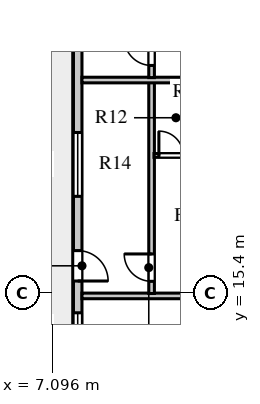
"""IFC4 building model, lengths in metres.
Left out: names, types, materials, properties, quantities, classifications, styles, units other than length and angle.
Written with IfcOpenShell. Run it as: python <this file> out.ifc"""

import sys

from ifc_helpers import new_model, si_unit, direction, frame, frame_2d, origin, place, context, subcontext, project, spatial, rectangle, extrude, element, fill, save


model = new_model("IFC4")
c1 = context("Model", 3, precision=1e-05, world=origin(), true_north=direction((0.0, 1.0)))
c2 = subcontext(c1, "Body", "Model", "MODEL_VIEW")
j1 = project(units=[si_unit("LENGTHUNIT", "METRE"), si_unit("PLANEANGLEUNIT", "RADIAN")], contexts=[c1])
p1 = place(None, origin())
s1 = spatial("IfcSite", under=j1, at=p1, CompositionType="ELEMENT")
p2 = place(p1, origin())
s2 = spatial("IfcBuilding", under=s1, at=p2, CompositionType="ELEMENT")
p3 = place(p2, frame((0.0, 0.0, 260.9)))
s3 = spatial("IfcBuildingStorey", under=s2, at=p3, CompositionType="ELEMENT", Elevation=260.9)
p4 = place(p3, frame((7.94, 44.07, 0.0), z_axis=(0.0, 0.0, 1.0), x_axis=(0.0, -1.0, 0.0)))
e1 = element("IfcWall", 1, at=p4, inside=s3, PredefinedType="STANDARD", context=c2, shape_type="SweptSolid", body=[
    extrude(rectangle(XDim=30.94, YDim=0.28, at=frame_2d((15.47, 0.0))), origin(), (0.0, 0.0, 1.0), 3.66),
])
p5 = place(p4, frame((29.325, 0.0, 0.8)))
e2 = element("IfcOpeningElement", 2, at=p5, cuts=e1, PredefinedType="OPENING", context=c2, shape_type="SweptSolid", body=[
    extrude(rectangle(XDim=0.95, YDim=1.65, at=frame_2d((0.475, 0.825))), frame((0.0, 0.15, 0.0), z_axis=(0.0, -1.0, 0.0), x_axis=(1.0, 0.0, 0.0)), (0.0, 0.0, 1.0), 0.3),
])
p6 = place(p4, frame((27.28, 0.0, 0.0)))
e3 = element("IfcOpeningElement", 3, at=p6, cuts=e1, PredefinedType="OPENING", context=c2, shape_type="SweptSolid", body=[
    extrude(rectangle(XDim=1.0, YDim=2.05, at=frame_2d((0.5, 1.025))), frame((0.0, 0.15, 0.0), z_axis=(0.0, -1.0, 0.0), x_axis=(1.0, 0.0, 0.0)), (0.0, 0.0, 1.0), 0.3),
])
p7 = place(p4, frame((23.395, 0.0, 0.8)))
e4 = element("IfcOpeningElement", 4, at=p7, cuts=e1, PredefinedType="OPENING", context=c2, shape_type="SweptSolid", body=[
    extrude(rectangle(XDim=2.1, YDim=1.95, at=frame_2d((1.05, 0.975))), frame((0.0, 0.15, 0.0), z_axis=(0.0, -1.0, 0.0), x_axis=(1.0, 0.0, 0.0)), (0.0, 0.0, 1.0), 0.3),
])
p8 = place(p4, frame((17.695, 0.0, 0.8)))
e5 = element("IfcOpeningElement", 5, at=p8, cuts=e1, PredefinedType="OPENING", context=c2, shape_type="SweptSolid", body=[
    extrude(rectangle(XDim=1.35, YDim=1.9, at=frame_2d((0.675, 0.95))), frame((0.0, 0.15, 0.0), z_axis=(0.0, -1.0, 0.0), x_axis=(1.0, 0.0, 0.0)), (0.0, 0.0, 1.0), 0.3),
])
p9 = place(p4, frame((11.02, 0.0, 0.8)))
e6 = element("IfcOpeningElement", 6, at=p9, cuts=e1, PredefinedType="OPENING", context=c2, shape_type="SweptSolid", body=[
    extrude(rectangle(XDim=1.65, YDim=1.95, at=frame_2d((0.825, 0.975))), frame((0.0, 0.15, 0.0), z_axis=(0.0, -1.0, 0.0), x_axis=(1.0, 0.0, 0.0)), (0.0, 0.0, 1.0), 0.3),
])
p10 = place(p4, frame((4.42, 0.0, 0.8)))
e7 = element("IfcOpeningElement", 7, at=p10, cuts=e1, PredefinedType="OPENING", context=c2, shape_type="SweptSolid", body=[
    extrude(rectangle(XDim=1.95, YDim=2.0, at=frame_2d((0.975, 1.0))), frame((0.0, 0.15, 0.0), z_axis=(0.0, -1.0, 0.0), x_axis=(1.0, 0.0, 0.0)), (0.0, 0.0, 1.0), 0.3),
])
p11 = place(p4, frame((0.665, 0.0, 0.8)))
e8 = element("IfcOpeningElement", 8, at=p11, cuts=e1, PredefinedType="OPENING", context=c2, shape_type="SweptSolid", body=[
    extrude(rectangle(XDim=0.95, YDim=1.65, at=frame_2d((0.475, 0.825))), frame((0.0, 0.15, 0.0), z_axis=(0.0, -1.0, 0.0), x_axis=(1.0, 0.0, 0.0)), (0.0, 0.0, 1.0), 0.3),
])
p12 = place(p3, frame((8.08, 15.3, 0.0), z_axis=(0.0, 0.0, 1.0), x_axis=(1.0, 0.0, 0.0)))
e9 = element("IfcWall", 9, at=p12, inside=s3, PredefinedType="SOLIDWALL", context=c2, shape_type="SweptSolid", body=[
    extrude(rectangle(XDim=5.62, YDim=0.185, at=frame_2d((2.81, 0.0))), origin(), (0.0, 0.0, 1.0), 3.21),
])
p13 = place(p3, frame((10.37, 15.38, 0.0), z_axis=(0.0, 0.0, 1.0), x_axis=(0.0, 1.0, 0.0)))
e10 = element("IfcWall", 10, at=p13, inside=s3, PredefinedType="SOLIDWALL", context=c2, shape_type="SweptSolid", body=[
    extrude(rectangle(XDim=6.94, YDim=0.185, at=frame_2d((3.47, 0.0))), origin(), (0.0, 0.0, 1.0), 3.66),
])
p14 = place(p13, frame((0.4, 0.0, 0.0)))
e11 = element("IfcOpeningElement", 11, at=p14, cuts=e10, PredefinedType="OPENING", context=c2, shape_type="SweptSolid", body=[
    extrude(rectangle(XDim=0.9, YDim=2.08, at=frame_2d((0.45, 1.04))), frame((0.0, 0.103, 0.0), z_axis=(0.0, -1.0, 0.0), x_axis=(1.0, 0.0, 0.0)), (0.0, 0.0, 1.0), 0.205),
])
p15 = place(p3, frame((10.45, 19.92, 0.0), z_axis=(0.0, 0.0, 1.0), x_axis=(1.0, 0.0, 0.0)))
e12 = element("IfcWall", 12, at=p15, inside=s3, PredefinedType="PLUMBINGWALL", context=c2, shape_type="SweptSolid", body=[
    extrude(rectangle(XDim=3.17, YDim=0.125, at=frame_2d((1.585, 0.0))), origin(), (0.0, 0.0, 1.0), 3.66),
])
p16 = place(p15, frame((0.16, 0.0, 0.0)))
e13 = element("IfcOpeningElement", 13, at=p16, cuts=e12, PredefinedType="OPENING", context=c2, shape_type="SweptSolid", body=[
    extrude(rectangle(XDim=0.8, YDim=2.05, at=frame_2d((0.4, 1.025))), frame((0.0, 0.073, 0.0), z_axis=(0.0, -1.0, 0.0), x_axis=(1.0, 0.0, 0.0)), (0.0, 0.0, 1.0), 0.145),
])
p17 = place(p15, frame((1.782, 0.0, 0.0)))
e14 = element("IfcOpeningElement", 14, at=p17, cuts=e12, PredefinedType="OPENING", context=c2, shape_type="SweptSolid", body=[
    extrude(rectangle(XDim=0.8, YDim=2.05, at=frame_2d((0.4, 1.025))), frame((0.0, 0.073, 0.0), z_axis=(0.0, -1.0, 0.0), x_axis=(1.0, 0.0, 0.0)), (0.0, 0.0, 1.0), 0.145),
])
p18 = place(p3, frame((8.08, 22.4, 0.0), z_axis=(0.0, 0.0, 1.0), x_axis=(1.0, 0.0, 0.0)))
e15 = element("IfcWall", 15, at=p18, inside=s3, PredefinedType="SOLIDWALL", context=c2, shape_type="SweptSolid", body=[
    extrude(rectangle(XDim=5.56, YDim=0.185, at=frame_2d((2.78, 0.0))), origin(), (0.0, 0.0, 1.0), 3.66),
])
p19 = place(p3, frame((10.37, 22.48, 0.0), z_axis=(0.0, 0.0, 1.0), x_axis=(0.0, 1.0, 0.0)))
e16 = element("IfcWall", 16, at=p19, inside=s3, PredefinedType="SOLIDWALL", context=c2, shape_type="SweptSolid", body=[
    extrude(rectangle(XDim=6.44, YDim=0.185, at=frame_2d((3.22, 0.0))), origin(), (0.0, 0.0, 1.0), 3.66),
])
p20 = place(p19, frame((0.4, 0.0, 0.0)))
e17 = element("IfcOpeningElement", 17, at=p20, cuts=e16, PredefinedType="OPENING", context=c2, shape_type="SweptSolid", body=[
    extrude(rectangle(XDim=0.9, YDim=2.08, at=frame_2d((0.45, 1.04))), frame((0.0, 0.103, 0.0), z_axis=(0.0, -1.0, 0.0), x_axis=(1.0, 0.0, 0.0)), (0.0, 0.0, 1.0), 0.205),
])
p21 = place(p5, origin())
e18 = element("IfcWindow", 18, at=p21, inside=s3, PartitioningType="SINGLE_PANEL", PredefinedType="WINDOW", context=c2, shape_type="SweptSolid", body=[
    extrude(rectangle(XDim=0.95, YDim=1.65, at=frame_2d((0.475, 0.825))), frame((0.0, 0.03, 0.0), z_axis=(0.0, -1.0, 0.0), x_axis=(1.0, 0.0, 0.0)), (0.0, 0.0, 1.0), 0.06),
])
fill(e2, e18)
p22 = place(p6, frame((1.0, 0.0, 0.0), z_axis=(0.0, 0.0, 1.0), x_axis=(-1.0, 0.0, 0.0)))
e19 = element("IfcDoor", 19, at=p22, inside=s3, OperationType="SINGLE_SWING_LEFT", PredefinedType="DOOR", context=c2, shape_type="SweptSolid", body=[
    extrude(rectangle(XDim=1.0, YDim=2.05, at=frame_2d((0.5, 1.025))), frame((0.0, 0.025, 0.0), z_axis=(0.0, -1.0, 0.0), x_axis=(1.0, 0.0, 0.0)), (0.0, 0.0, 1.0), 0.05),
])
fill(e3, e19)
p23 = place(p7, origin())
e20 = element("IfcWindow", 20, at=p23, inside=s3, PartitioningType="SINGLE_PANEL", PredefinedType="WINDOW", context=c2, shape_type="SweptSolid", body=[
    extrude(rectangle(XDim=2.1, YDim=1.95, at=frame_2d((1.05, 0.975))), frame((0.0, 0.03, 0.0), z_axis=(0.0, -1.0, 0.0), x_axis=(1.0, 0.0, 0.0)), (0.0, 0.0, 1.0), 0.06),
])
fill(e4, e20)
p24 = place(p16, origin())
e21 = element("IfcDoor", 21, at=p24, inside=s3, OperationType="SINGLE_SWING_LEFT", PredefinedType="DOOR", context=c2, shape_type="SweptSolid", body=[
    extrude(rectangle(XDim=0.8, YDim=2.05, at=frame_2d((0.4, 1.025))), frame((0.0, 0.025, 0.0), z_axis=(0.0, -1.0, 0.0), x_axis=(1.0, 0.0, 0.0)), (0.0, 0.0, 1.0), 0.05),
])
fill(e13, e21)
p25 = place(p14, frame((0.9, 0.0, 0.0), z_axis=(0.0, 0.0, 1.0), x_axis=(-1.0, 0.0, 0.0)))
e22 = element("IfcDoor", 22, at=p25, inside=s3, OperationType="SINGLE_SWING_LEFT", PredefinedType="DOOR", context=c2, shape_type="SweptSolid", body=[
    extrude(rectangle(XDim=0.9, YDim=2.08, at=frame_2d((0.45, 1.04))), frame((0.0, 0.025, 0.0), z_axis=(0.0, -1.0, 0.0), x_axis=(1.0, 0.0, 0.0)), (0.0, 0.0, 1.0), 0.05),
])
fill(e11, e22)
p26 = place(p20, frame((0.9, 0.0, 0.0), z_axis=(0.0, 0.0, 1.0), x_axis=(-1.0, 0.0, 0.0)))
e23 = element("IfcDoor", 23, at=p26, inside=s3, OperationType="SINGLE_SWING_LEFT", PredefinedType="DOOR", context=c2, shape_type="SweptSolid", body=[
    extrude(rectangle(XDim=0.9, YDim=2.08, at=frame_2d((0.45, 1.04))), frame((0.0, 0.025, 0.0), z_axis=(0.0, -1.0, 0.0), x_axis=(1.0, 0.0, 0.0)), (0.0, 0.0, 1.0), 0.05),
])
fill(e17, e23)
save(model, sys.argv[1])
